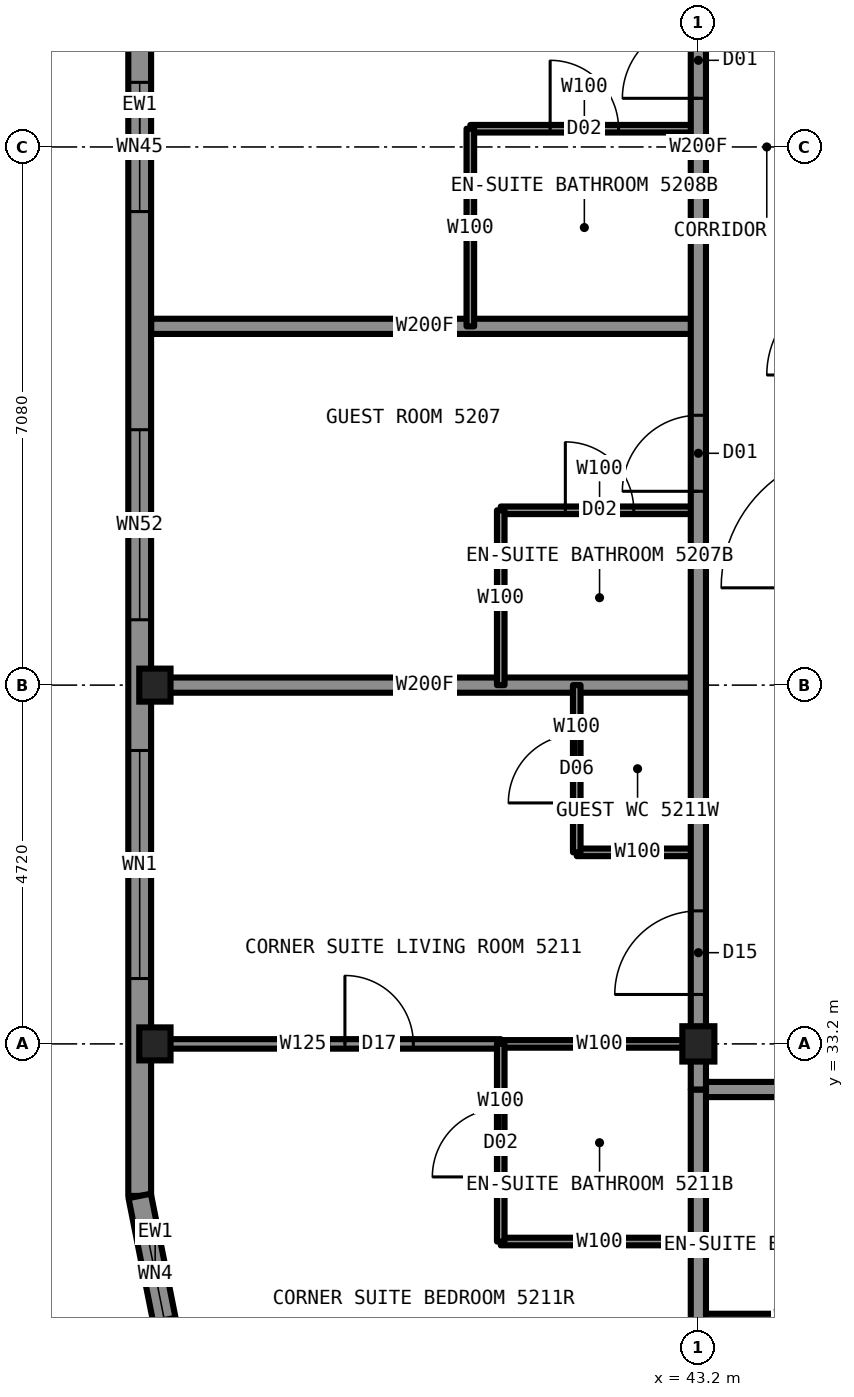
"""IFC4 building model, lengths in metres.
Left out: names, types, materials, properties, quantities, classifications, styles, units other than length and angle.
Written with IfcOpenShell. Run it as: python <this file> out.ifc"""

import sys

from ifc_helpers import new_model, si_unit, direction, frame, frame_2d, origin, origin_2d, place, context, subcontext, project, spatial, rectangle, i_section, extrude, element, fill, save


model = new_model("IFC4")
c1 = context("Model", 3, precision=1e-05, world=origin(), true_north=direction((0.0, 1.0)))
c2 = subcontext(c1, "Body", "Model", "MODEL_VIEW")
j1 = project(units=[si_unit("LENGTHUNIT", "METRE"), si_unit("PLANEANGLEUNIT", "RADIAN")], contexts=[c1])
p1 = place(None, origin())
s1 = spatial("IfcSite", under=j1, at=p1, CompositionType="ELEMENT")
p2 = place(p1, origin())
s2 = spatial("IfcBuilding", under=s1, at=p2, CompositionType="ELEMENT")
p3 = place(p2, frame((0.0, 0.0, 193.3)))
s3 = spatial("IfcBuildingStorey", under=s2, at=p3, CompositionType="ELEMENT", Elevation=193.3)
for number, where, z_axis, x_axis in (
    (1, (36.05, 33.2, 0.0), (0.0, 0.0, 1.0), (1.0, 0.0, 0.0)),
    (2, (36.05, 37.92, 0.0), (0.0, 0.0, 1.0), (1.0, 0.0, 0.0)),
):
    element("IfcColumn", number, at=place(p3, frame(where, z_axis=z_axis, x_axis=x_axis)), inside=s3, PredefinedType="COLUMN", context=c2, shape_type="SweptSolid", body=[
        extrude(i_section(OverallWidth=0.411, OverallDepth=0.434, WebThickness=0.036, FlangeThickness=0.057, at=origin_2d()), origin(), (0.0, 0.0, 1.0), 3.5),
    ])
p4 = place(p3, frame((43.2, 33.2, 0.0), z_axis=(0.0, 0.0, 1.0), x_axis=(1.0, 0.0, 0.0)))
e3 = element("IfcColumn", 3, at=p4, inside=s3, PredefinedType="COLUMN", context=c2, shape_type="SweptSolid", body=[
    extrude(i_section(OverallWidth=0.422, OverallDepth=0.465, WebThickness=0.045, FlangeThickness=0.073, at=origin_2d()), origin(), (0.0, 0.0, 1.0), 3.5),
])
p5 = place(p3, frame((40.6, 33.2, 0.0), z_axis=(0.0, 0.0, 1.0), x_axis=(1.0, 0.0, 0.0)))
e4 = element("IfcWall", 4, at=p5, inside=s3, PredefinedType="PARTITIONING", context=c2, shape_type="SweptSolid", body=[
    extrude(rectangle(XDim=2.6, YDim=0.1, at=frame_2d((1.3, 0.0))), origin(), (0.0, 0.0, 1.0), 2.573),
])
p6 = place(p3, frame((36.0, 33.2, 0.0), z_axis=(0.0, 0.0, 1.0), x_axis=(1.0, 0.0, 0.0)))
e5 = element("IfcWall", 5, at=p6, inside=s3, PredefinedType="PARTITIONING", context=c2, shape_type="SweptSolid", body=[
    extrude(rectangle(XDim=4.6, YDim=0.125, at=frame_2d((2.3, 0.0))), origin(), (0.0, 0.0, 1.0), 2.573),
])
p7 = place(p6, frame((2.55, 0.0, 0.0)))
e6 = element("IfcOpeningElement", 6, at=p7, cuts=e5, PredefinedType="OPENING", context=c2, shape_type="SweptSolid", body=[
    extrude(rectangle(XDim=0.9, YDim=2.2, at=frame_2d((0.45, 1.1))), frame((0.0, 0.073, 0.0), z_axis=(0.0, -1.0, 0.0), x_axis=(1.0, 0.0, 0.0)), (0.0, 0.0, 1.0), 0.145),
])
p8 = place(p3, frame((43.2, 32.6, 0.0), z_axis=(0.0, 0.0, 1.0), x_axis=(1.0, 0.0, 0.0)))
e7 = element("IfcWall", 7, at=p8, inside=s3, PredefinedType="PARTITIONING", context=c2, shape_type="SweptSolid", body=[
    extrude(rectangle(XDim=23.6, YDim=0.2, at=frame_2d((11.8, 0.0))), origin(), (0.0, 0.0, 1.0), 3.33),
])
p9 = place(p8, frame((3.0, 0.0, 0.0)))
e8 = element("IfcOpeningElement", 8, at=p9, cuts=e7, PredefinedType="OPENING", context=c2, shape_type="SweptSolid", body=[
    extrude(rectangle(XDim=1.0, YDim=2.2, at=frame_2d((0.5, 1.1))), frame((0.0, 0.11, 0.0), z_axis=(0.0, -1.0, 0.0), x_axis=(1.0, 0.0, 0.0)), (0.0, 0.0, 1.0), 0.22),
])
p10 = place(p8, frame((11.29, 0.0, 0.0)))
e9 = element("IfcOpeningElement", 9, at=p10, cuts=e7, PredefinedType="OPENING", context=c2, shape_type="SweptSolid", body=[
    extrude(rectangle(XDim=1.1, YDim=2.2, at=frame_2d((0.55, 1.1))), frame((0.0, 0.11, 0.0), z_axis=(0.0, -1.0, 0.0), x_axis=(1.0, 0.0, 0.0)), (0.0, 0.0, 1.0), 0.22),
])
p11 = place(p3, frame((40.6, 30.6, 0.0), z_axis=(0.0, 0.0, 1.0), x_axis=(1.0, 0.0, 0.0)))
e10 = element("IfcWall", 10, at=p11, inside=s3, PredefinedType="PARTITIONING", context=c2, shape_type="SweptSolid", body=[
    extrude(rectangle(XDim=2.6, YDim=0.1, at=frame_2d((1.3, 0.0))), origin(), (0.0, 0.0, 1.0), 3.33),
])
p12 = place(p3, frame((43.2, 29.6, 0.0), z_axis=(0.0, 0.0, 1.0), x_axis=(1.0, 0.0, 0.0)))
e11 = element("IfcWall", 11, at=p12, inside=s3, PredefinedType="PARTITIONING", context=c2, shape_type="SweptSolid", body=[
    extrude(rectangle(XDim=2.6, YDim=0.1, at=frame_2d((1.3, 0.0))), origin(), (0.0, 0.0, 1.0), 3.33),
])
p13 = place(p3, frame((36.0, 42.64, 0.0), z_axis=(0.0, 0.0, 1.0), x_axis=(1.0, 0.0, 0.0)))
e12 = element("IfcWall", 12, at=p13, inside=s3, PredefinedType="PARTITIONING", context=c2, shape_type="SweptSolid", body=[
    extrude(rectangle(XDim=7.2, YDim=0.2, at=frame_2d((3.6, 0.0))), origin(), (0.0, 0.0, 1.0), 2.73),
])
p14 = place(p3, frame((40.6, 40.22, 0.0), z_axis=(0.0, 0.0, 1.0), x_axis=(1.0, 0.0, 0.0)))
e13 = element("IfcWall", 13, at=p14, inside=s3, PredefinedType="PARTITIONING", context=c2, shape_type="SweptSolid", body=[
    extrude(rectangle(XDim=2.6, YDim=0.1, at=frame_2d((1.3, 0.0))), origin(), (0.0, 0.0, 1.0), 2.73),
])
p15 = place(p14, frame((0.85, 0.0, 0.0)))
e14 = element("IfcOpeningElement", 14, at=p15, cuts=e13, PredefinedType="OPENING", context=c2, shape_type="SweptSolid", body=[
    extrude(rectangle(XDim=0.9, YDim=2.1, at=frame_2d((0.45, 1.05))), frame((0.0, 0.06, 0.0), z_axis=(0.0, -1.0, 0.0), x_axis=(1.0, 0.0, 0.0)), (0.0, 0.0, 1.0), 0.12),
])
p16 = place(p3, frame((36.0, 37.92, 0.0), z_axis=(0.0, 0.0, 1.0), x_axis=(1.0, 0.0, 0.0)))
e15 = element("IfcWall", 15, at=p16, inside=s3, PredefinedType="PARTITIONING", context=c2, shape_type="SweptSolid", body=[
    extrude(rectangle(XDim=7.2, YDim=0.2, at=frame_2d((3.6, 0.0))), origin(), (0.0, 0.0, 1.0), 2.573),
])
p17 = place(p3, frame((41.6, 35.72, 0.0), z_axis=(0.0, 0.0, 1.0), x_axis=(1.0, 0.0, 0.0)))
e16 = element("IfcWall", 16, at=p17, inside=s3, PredefinedType="PARTITIONING", context=c2, shape_type="SweptSolid", body=[
    extrude(rectangle(XDim=1.6, YDim=0.1, at=frame_2d((0.8, 0.0))), origin(), (0.0, 0.0, 1.0), 3.33),
])
p18 = place(p3, frame((40.2, 45.24, 0.0), z_axis=(0.0, 0.0, 1.0), x_axis=(1.0, 0.0, 0.0)))
e17 = element("IfcWall", 17, at=p18, inside=s3, PredefinedType="PARTITIONING", context=c2, shape_type="SweptSolid", body=[
    extrude(rectangle(XDim=3.0, YDim=0.1, at=frame_2d((1.5, 0.0))), origin(), (0.0, 0.0, 1.0), 3.33),
])
p19 = place(p18, frame((1.05, 0.0, 0.0)))
e18 = element("IfcOpeningElement", 18, at=p19, cuts=e17, PredefinedType="OPENING", context=c2, shape_type="SweptSolid", body=[
    extrude(rectangle(XDim=0.9, YDim=2.1, at=frame_2d((0.45, 1.05))), frame((0.0, 0.06, 0.0), z_axis=(0.0, -1.0, 0.0), x_axis=(1.0, 0.0, 0.0)), (0.0, 0.0, 1.0), 0.12),
])
p20 = place(p3, frame((43.2, 33.22, 0.0), z_axis=(0.0, 0.0, 1.0), x_axis=(0.0, 1.0, 0.0)))
e19 = element("IfcWall", 19, at=p20, inside=s3, PredefinedType="PARTITIONING", context=c2, shape_type="SweptSolid", body=[
    extrude(rectangle(XDim=23.56, YDim=0.2, at=frame_2d((11.78, 0.0))), origin(), (0.0, 0.0, 1.0), 3.33),
])
p21 = place(p20, frame((7.25, 0.0, 0.0)))
e20 = element("IfcOpeningElement", 20, at=p21, cuts=e19, PredefinedType="OPENING", context=c2, shape_type="SweptSolid", body=[
    extrude(rectangle(XDim=1.0, YDim=2.2, at=frame_2d((0.5, 1.1))), frame((0.0, 0.11, 0.0), z_axis=(0.0, -1.0, 0.0), x_axis=(1.0, 0.0, 0.0)), (0.0, 0.0, 1.0), 0.22),
])
p22 = place(p20, frame((12.42, 0.0, 0.0)))
e21 = element("IfcOpeningElement", 21, at=p22, cuts=e19, PredefinedType="OPENING", context=c2, shape_type="SweptSolid", body=[
    extrude(rectangle(XDim=1.0, YDim=2.2, at=frame_2d((0.5, 1.1))), frame((0.0, 0.11, 0.0), z_axis=(0.0, -1.0, 0.0), x_axis=(1.0, 0.0, 0.0)), (0.0, 0.0, 1.0), 0.22),
])
p23 = place(p20, frame((22.03, 0.0, 0.0)))
e22 = element("IfcOpeningElement", 22, at=p23, cuts=e19, PredefinedType="OPENING", context=c2, shape_type="SweptSolid", body=[
    extrude(rectangle(XDim=1.1, YDim=2.2, at=frame_2d((0.55, 1.1))), frame((0.0, 0.11, 0.0), z_axis=(0.0, -1.0, 0.0), x_axis=(1.0, 0.0, 0.0)), (0.0, 0.0, 1.0), 0.22),
])
p24 = place(p20, frame((0.63, 0.0, 0.0)))
e23 = element("IfcOpeningElement", 23, at=p24, cuts=e19, PredefinedType="OPENING", context=c2, shape_type="SweptSolid", body=[
    extrude(rectangle(XDim=1.1, YDim=2.2, at=frame_2d((0.55, 1.1))), frame((0.0, 0.11, 0.0), z_axis=(0.0, -1.0, 0.0), x_axis=(1.0, 0.0, 0.0)), (0.0, 0.0, 1.0), 0.22),
])
p25 = place(p3, frame((43.2, 26.0, 0.0), z_axis=(0.0, 0.0, 1.0), x_axis=(0.0, 1.0, 0.0)))
e24 = element("IfcWall", 24, at=p25, inside=s3, PredefinedType="PARTITIONING", context=c2, shape_type="SweptSolid", body=[
    extrude(rectangle(XDim=6.6, YDim=0.2, at=frame_2d((3.3, 0.0))), origin(), (0.0, 0.0, 1.0), 2.573),
])
p26 = place(p3, frame((41.6, 35.72, 0.0), z_axis=(0.0, 0.0, 1.0), x_axis=(0.0, 1.0, 0.0)))
e25 = element("IfcWall", 25, at=p26, inside=s3, PredefinedType="PARTITIONING", context=c2, shape_type="SweptSolid", body=[
    extrude(rectangle(XDim=2.2, YDim=0.1, at=frame_2d((1.1, 0.0))), origin(), (0.0, 0.0, 1.0), 3.33),
])
p27 = place(p26, frame((0.65, 0.0, 0.0)))
e26 = element("IfcOpeningElement", 26, at=p27, cuts=e25, PredefinedType="OPENING", context=c2, shape_type="SweptSolid", body=[
    extrude(rectangle(XDim=0.9, YDim=2.1, at=frame_2d((0.45, 1.05))), frame((0.0, 0.06, 0.0), z_axis=(0.0, -1.0, 0.0), x_axis=(1.0, 0.0, 0.0)), (0.0, 0.0, 1.0), 0.12),
])
p28 = place(p3, frame((40.6, 30.6, 0.0), z_axis=(0.0, 0.0, 1.0), x_axis=(0.0, 1.0, 0.0)))
e27 = element("IfcWall", 27, at=p28, inside=s3, PredefinedType="PARTITIONING", context=c2, shape_type="SweptSolid", body=[
    extrude(rectangle(XDim=2.6, YDim=0.1, at=frame_2d((1.3, 0.0))), origin(), (0.0, 0.0, 1.0), 3.33),
])
p29 = place(p28, frame((0.85, 0.0, 0.0)))
e28 = element("IfcOpeningElement", 28, at=p29, cuts=e27, PredefinedType="OPENING", context=c2, shape_type="SweptSolid", body=[
    extrude(rectangle(XDim=0.9, YDim=2.1, at=frame_2d((0.45, 1.05))), frame((0.0, 0.06, 0.0), z_axis=(0.0, -1.0, 0.0), x_axis=(1.0, 0.0, 0.0)), (0.0, 0.0, 1.0), 0.12),
])
p30 = place(p3, frame((40.6, 37.92, 0.0), z_axis=(0.0, 0.0, 1.0), x_axis=(0.0, 1.0, 0.0)))
e29 = element("IfcWall", 29, at=p30, inside=s3, PredefinedType="PARTITIONING", context=c2, shape_type="SweptSolid", body=[
    extrude(rectangle(XDim=2.3, YDim=0.1, at=frame_2d((1.15, 0.0))), origin(), (0.0, 0.0, 1.0), 3.33),
])
p31 = place(p3, frame((40.2, 42.64, 0.0), z_axis=(0.0, 0.0, 1.0), x_axis=(0.0, 1.0, 0.0)))
e30 = element("IfcWall", 30, at=p31, inside=s3, PredefinedType="PARTITIONING", context=c2, shape_type="SweptSolid", body=[
    extrude(rectangle(XDim=2.6, YDim=0.1, at=frame_2d((1.3, 0.0))), origin(), (0.0, 0.0, 1.0), 3.33),
])
p32 = place(p3, frame((35.85, 58.8, 0.0), z_axis=(0.0, 0.0, 1.0), x_axis=(0.0, -1.0, 0.0)))
e31 = element("IfcWall", 31, at=p32, inside=s3, PredefinedType="SOLIDWALL", context=c2, shape_type="SweptSolid", body=[
    extrude(rectangle(XDim=27.6, YDim=0.3, at=frame_2d((13.8, 0.0))), origin(), (0.0, 0.0, 1.0), 2.83),
])
p33 = place(p32, frame((2.86, 0.0, 0.3)))
e32 = element("IfcOpeningElement", 32, at=p33, cuts=e31, PredefinedType="OPENING", context=c2, shape_type="SweptSolid", body=[
    extrude(rectangle(XDim=3.0, YDim=2.0, at=frame_2d((1.5, 1.0))), frame((0.0, 0.16, 0.0), z_axis=(0.0, -1.0, 0.0), x_axis=(1.0, 0.0, 0.0)), (0.0, 0.0, 1.0), 0.32),
])
p34 = place(p32, frame((7.58, 0.0, 0.3)))
e33 = element("IfcOpeningElement", 33, at=p34, cuts=e31, PredefinedType="OPENING", context=c2, shape_type="SweptSolid", body=[
    extrude(rectangle(XDim=2.5, YDim=2.0, at=frame_2d((1.25, 1.0))), frame((0.0, 0.16, 0.0), z_axis=(0.0, -1.0, 0.0), x_axis=(1.0, 0.0, 0.0)), (0.0, 0.0, 1.0), 0.32),
])
p35 = place(p32, frame((12.95, 0.0, 1.0)))
e34 = element("IfcOpeningElement", 34, at=p35, cuts=e31, PredefinedType="OPENING", context=c2, shape_type="SweptSolid", body=[
    extrude(rectangle(XDim=1.7, YDim=1.3, at=frame_2d((0.85, 0.65))), frame((0.0, 0.16, 0.0), z_axis=(0.0, -1.0, 0.0), x_axis=(1.0, 0.0, 0.0)), (0.0, 0.0, 1.0), 0.32),
])
p36 = place(p32, frame((17.52, 0.0, 0.3)))
e35 = element("IfcOpeningElement", 35, at=p36, cuts=e31, PredefinedType="OPENING", context=c2, shape_type="SweptSolid", body=[
    extrude(rectangle(XDim=2.5, YDim=2.0, at=frame_2d((1.25, 1.0))), frame((0.0, 0.16, 0.0), z_axis=(0.0, -1.0, 0.0), x_axis=(1.0, 0.0, 0.0)), (0.0, 0.0, 1.0), 0.32),
])
p37 = place(p32, frame((21.74, 0.0, 0.3)))
e36 = element("IfcOpeningElement", 36, at=p37, cuts=e31, PredefinedType="OPENING", context=c2, shape_type="SweptSolid", body=[
    extrude(rectangle(XDim=3.0, YDim=2.0, at=frame_2d((1.5, 1.0))), frame((0.0, 0.16, 0.0), z_axis=(0.0, -1.0, 0.0), x_axis=(1.0, 0.0, 0.0)), (0.0, 0.0, 1.0), 0.32),
])
p38 = place(p3, frame((35.85, 31.2, 0.0), z_axis=(0.0, 0.0, 1.0), x_axis=(0.195081421501, -0.980787050784, 0.0)))
e37 = element("IfcWall", 37, at=p38, inside=s3, PredefinedType="SOLIDWALL", context=c2, shape_type="SweptSolid", body=[
    extrude(rectangle(XDim=2.087, YDim=0.3, at=frame_2d((1.044, 0.0))), origin(), (0.0, 0.0, 1.0), 3.33),
])
p39 = place(p38, frame((0.444, 0.0, 0.3)))
e38 = element("IfcOpeningElement", 38, at=p39, cuts=e37, PredefinedType="OPENING", context=c2, shape_type="SweptSolid", body=[
    extrude(rectangle(XDim=1.2, YDim=2.0, at=frame_2d((0.6, 1.0))), frame((0.0, 0.16, 0.0), z_axis=(0.0, -1.0, 0.0), x_axis=(1.0, 0.0, 0.0)), (0.0, 0.0, 1.0), 0.32),
])
p40 = place(p3, frame((43.2, 32.6, 0.0), z_axis=(0.0, 0.0, 1.0), x_axis=(0.0, 1.0, 0.0)))
e39 = element("IfcWall", 39, at=p40, inside=s3, PredefinedType="PARTITIONING", context=c2, shape_type="SweptSolid", body=[
    extrude(rectangle(XDim=0.62, YDim=0.2, at=frame_2d((0.31, 0.0))), origin(), (0.0, 0.0, 1.0), 2.573),
])
p41 = place(p21, origin())
e40 = element("IfcDoor", 40, at=p41, inside=s3, OperationType="SINGLE_SWING_LEFT", PredefinedType="DOOR", context=c2, shape_type="SweptSolid", body=[
    extrude(rectangle(XDim=1.0, YDim=2.2, at=frame_2d((0.5, 1.1))), frame((0.0, 0.025, 0.0), z_axis=(0.0, -1.0, 0.0), x_axis=(1.0, 0.0, 0.0)), (0.0, 0.0, 1.0), 0.05),
])
fill(e20, e40)
p42 = place(p15, origin())
e41 = element("IfcDoor", 41, at=p42, inside=s3, OperationType="SINGLE_SWING_RIGHT", PredefinedType="DOOR", context=c2, shape_type="SweptSolid", body=[
    extrude(rectangle(XDim=0.9, YDim=2.1, at=frame_2d((0.45, 1.05))), frame((0.0, 0.025, 0.0), z_axis=(0.0, -1.0, 0.0), x_axis=(1.0, 0.0, 0.0)), (0.0, 0.0, 1.0), 0.05),
])
fill(e14, e41)
p43 = place(p22, origin())
e42 = element("IfcDoor", 42, at=p43, inside=s3, OperationType="SINGLE_SWING_LEFT", PredefinedType="DOOR", context=c2, shape_type="SweptSolid", body=[
    extrude(rectangle(XDim=1.0, YDim=2.2, at=frame_2d((0.5, 1.1))), frame((0.0, 0.025, 0.0), z_axis=(0.0, -1.0, 0.0), x_axis=(1.0, 0.0, 0.0)), (0.0, 0.0, 1.0), 0.05),
])
fill(e21, e42)
p44 = place(p19, origin())
e43 = element("IfcDoor", 43, at=p44, inside=s3, OperationType="SINGLE_SWING_RIGHT", PredefinedType="DOOR", context=c2, shape_type="SweptSolid", body=[
    extrude(rectangle(XDim=0.9, YDim=2.1, at=frame_2d((0.45, 1.05))), frame((0.0, 0.025, 0.0), z_axis=(0.0, -1.0, 0.0), x_axis=(1.0, 0.0, 0.0)), (0.0, 0.0, 1.0), 0.05),
])
fill(e18, e43)
p45 = place(p24, origin())
e44 = element("IfcDoor", 44, at=p45, inside=s3, OperationType="SINGLE_SWING_LEFT", PredefinedType="DOOR", context=c2, shape_type="SweptSolid", body=[
    extrude(rectangle(XDim=1.1, YDim=2.2, at=frame_2d((0.55, 1.1))), frame((0.0, 0.025, 0.0), z_axis=(0.0, -1.0, 0.0), x_axis=(1.0, 0.0, 0.0)), (0.0, 0.0, 1.0), 0.05),
])
fill(e23, e44)
p46 = place(p29, origin())
e45 = element("IfcDoor", 45, at=p46, inside=s3, OperationType="SINGLE_SWING_RIGHT", PredefinedType="DOOR", context=c2, shape_type="SweptSolid", body=[
    extrude(rectangle(XDim=0.9, YDim=2.1, at=frame_2d((0.45, 1.05))), frame((0.0, 0.025, 0.0), z_axis=(0.0, -1.0, 0.0), x_axis=(1.0, 0.0, 0.0)), (0.0, 0.0, 1.0), 0.05),
])
fill(e28, e45)
p47 = place(p7, origin())
e46 = element("IfcDoor", 46, at=p47, inside=s3, OperationType="SINGLE_SWING_LEFT", PredefinedType="DOOR", context=c2, shape_type="SweptSolid", body=[
    extrude(rectangle(XDim=0.9, YDim=2.2, at=frame_2d((0.45, 1.1))), frame((0.0, 0.025, 0.0), z_axis=(0.0, -1.0, 0.0), x_axis=(1.0, 0.0, 0.0)), (0.0, 0.0, 1.0), 0.05),
])
fill(e6, e46)
p48 = place(p27, origin())
e47 = element("IfcDoor", 47, at=p48, inside=s3, OperationType="SINGLE_SWING_LEFT", PredefinedType="DOOR", context=c2, shape_type="SweptSolid", body=[
    extrude(rectangle(XDim=0.9, YDim=2.1, at=frame_2d((0.45, 1.05))), frame((0.0, 0.025, 0.0), z_axis=(0.0, -1.0, 0.0), x_axis=(1.0, 0.0, 0.0)), (0.0, 0.0, 1.0), 0.05),
])
fill(e26, e47)
p49 = place(p35, origin())
e48 = element("IfcWindow", 48, at=p49, inside=s3, PartitioningType="SINGLE_PANEL", PredefinedType="WINDOW", context=c2, shape_type="SweptSolid", body=[
    extrude(rectangle(XDim=1.7, YDim=1.3, at=frame_2d((0.85, 0.65))), frame((0.0, 0.13, 0.0), z_axis=(0.0, -1.0, 0.0), x_axis=(1.0, 0.0, 0.0)), (0.0, 0.0, 1.0), 0.06),
])
fill(e34, e48)
p50 = place(p36, origin())
e49 = element("IfcWindow", 49, at=p50, inside=s3, PartitioningType="SINGLE_PANEL", PredefinedType="WINDOW", context=c2, shape_type="SweptSolid", body=[
    extrude(rectangle(XDim=2.5, YDim=2.0, at=frame_2d((1.25, 1.0))), frame((0.0, 0.13, 0.0), z_axis=(0.0, -1.0, 0.0), x_axis=(1.0, 0.0, 0.0)), (0.0, 0.0, 1.0), 0.06),
])
fill(e35, e49)
p51 = place(p37, origin())
e50 = element("IfcWindow", 50, at=p51, inside=s3, PartitioningType="SINGLE_PANEL", PredefinedType="WINDOW", context=c2, shape_type="SweptSolid", body=[
    extrude(rectangle(XDim=3.0, YDim=2.0, at=frame_2d((1.5, 1.0))), frame((0.0, 0.13, 0.0), z_axis=(0.0, -1.0, 0.0), x_axis=(1.0, 0.0, 0.0)), (0.0, 0.0, 1.0), 0.06),
])
fill(e36, e50)
p52 = place(p39, origin())
e51 = element("IfcWindow", 51, at=p52, inside=s3, PartitioningType="SINGLE_PANEL", PredefinedType="WINDOW", context=c2, shape_type="SweptSolid", body=[
    extrude(rectangle(XDim=1.2, YDim=2.0, at=frame_2d((0.6, 1.0))), frame((0.0, 0.13, 0.0), z_axis=(0.0, -1.0, 0.0), x_axis=(1.0, 0.0, 0.0)), (0.0, 0.0, 1.0), 0.06),
])
fill(e38, e51)
save(model, sys.argv[1])
